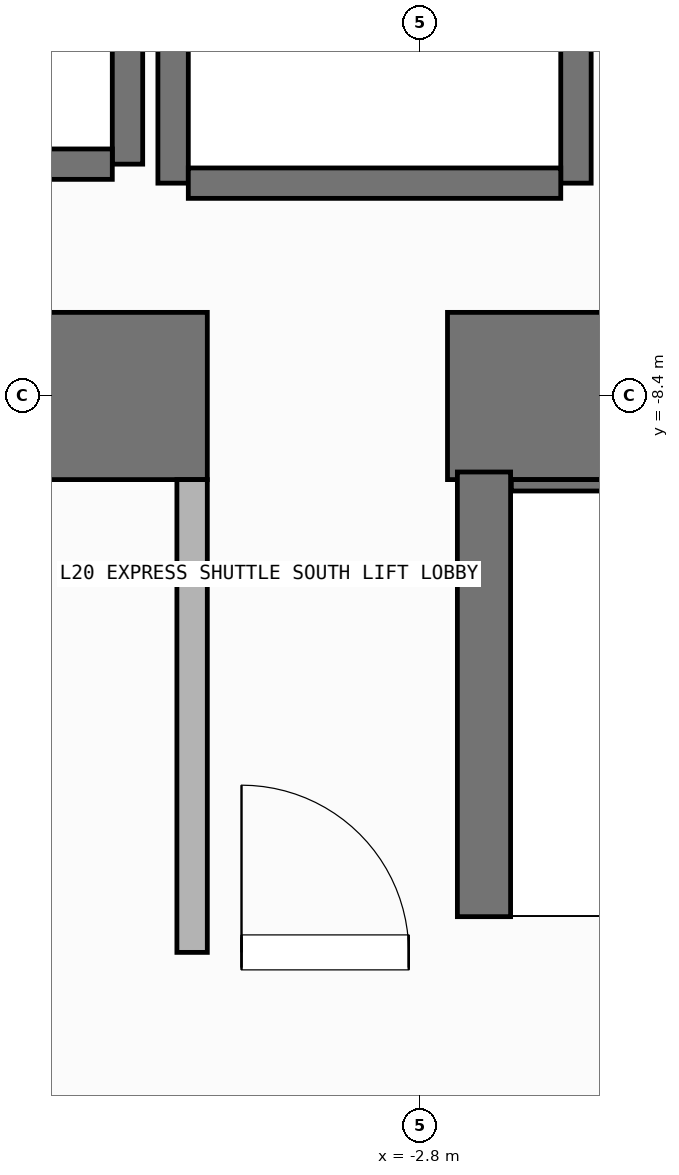
"""IFC4 building model, lengths in metres.
Left out: names, types, materials, properties, quantities, classifications, styles, units other than length and angle.
Written with IfcOpenShell. Run it as: python <this file> out.ifc"""

import sys

from ifc_helpers import new_model, si_unit, direction, frame, frame_2d, origin, place, context, subcontext, project, spatial, rectangle, extrude, element, fill, save


model = new_model("IFC4")
c1 = context("Model", 3, precision=1e-05, world=origin(), true_north=direction((0.0, 1.0)))
c2 = subcontext(c1, "Body", "Model", "MODEL_VIEW")
j1 = project(units=[si_unit("LENGTHUNIT", "METRE"), si_unit("PLANEANGLEUNIT", "RADIAN")], contexts=[c1])
p1 = place(None, origin())
s1 = spatial("IfcSite", under=j1, at=p1, CompositionType="ELEMENT")
p2 = place(p1, origin())
s2 = spatial("IfcBuilding", under=s1, at=p2, CompositionType="ELEMENT")
p3 = place(p2, frame((0.0, 0.0, 77.4)))
s3 = spatial("IfcBuildingStorey", under=s2, at=p3, CompositionType="ELEMENT", Elevation=77.4)
p4 = place(p3, frame((-7.55, -8.4, 0.0), z_axis=(0.0, 0.0, 1.0), x_axis=(1.0, 0.0, 0.0)))
e1 = element("IfcWall", 1, at=p4, inside=s3, PredefinedType="SHEAR", context=c2, shape_type="SweptSolid", body=[
    extrude(rectangle(XDim=3.35, YDim=1.1, at=frame_2d((1.675, 0.0))), origin(), (0.0, 0.0, 1.0), 7.8),
])
p5 = place(p3, frame((-2.62, -8.4, 0.0), z_axis=(0.0, 0.0, 1.0), x_axis=(1.0, 0.0, 0.0)))
e2 = element("IfcWall", 2, at=p5, inside=s3, PredefinedType="SHEAR", context=c2, shape_type="SweptSolid", body=[
    extrude(rectangle(XDim=7.27, YDim=1.1, at=frame_2d((3.635, 0.0))), origin(), (0.0, 0.0, 1.0), 7.8),
])
p6 = place(p3, frame((-2.555, -12.0, 0.0), z_axis=(0.0, 0.0, 1.0), x_axis=(1.0, 0.0, 0.0)))
e3 = element("IfcWall", 3, at=p6, inside=s3, PredefinedType="SHEAR", context=c2, shape_type="SweptSolid", body=[
    extrude(rectangle(XDim=7.31, YDim=0.35, at=frame_2d((3.655, 0.0))), origin(), (0.0, 0.0, 1.0), 7.8),
])
p7 = place(p3, frame((-2.2, -8.988, 0.0), z_axis=(0.0, 0.0, 1.0), x_axis=(1.0, 0.0, 0.0)))
e4 = element("IfcWall", 4, at=p7, inside=s3, PredefinedType="SHEAR", context=c2, shape_type="SweptSolid", body=[
    extrude(rectangle(XDim=6.6, YDim=0.075, at=frame_2d((3.3, 0.0))), origin(), (0.0, 0.0, 1.0), 7.8),
])
p8 = place(p3, frame((-2.38, -11.825, 0.0), z_axis=(0.0, 0.0, 1.0), x_axis=(0.0, 1.0, 0.0)))
e5 = element("IfcWall", 5, at=p8, inside=s3, PredefinedType="SHEAR", context=c2, shape_type="SweptSolid", body=[
    extrude(rectangle(XDim=2.925, YDim=0.35, at=frame_2d((1.462, 0.0))), origin(), (0.0, 0.0, 1.0), 7.8),
])
p9 = place(p3, frame((-4.725, -6.875, 0.0), z_axis=(0.0, 0.0, 1.0), x_axis=(0.0, 1.0, 0.0)))
e6 = element("IfcWall", 6, at=p9, inside=s3, PredefinedType="SHEAR", context=c2, shape_type="SweptSolid", body=[
    extrude(rectangle(XDim=2.55, YDim=0.2, at=frame_2d((1.275, 0.0))), origin(), (0.0, 0.0, 1.0), 7.52),
])
p10 = place(p3, frame((-7.175, -6.875, 0.0), z_axis=(0.0, 0.0, 1.0), x_axis=(1.0, 0.0, 0.0)))
e7 = element("IfcWall", 7, at=p10, inside=s3, PredefinedType="SHEAR", context=c2, shape_type="SweptSolid", body=[
    extrude(rectangle(XDim=2.35, YDim=0.2, at=frame_2d((1.175, 0.0))), origin(), (0.0, 0.0, 1.0), 7.52),
])
for number, where, z_axis, x_axis in (
    (8, (-4.425, -7.0, 0.0), (0.0, 0.0, 1.0), (0.0, 1.0, 0.0)),
    (9, (-1.775, -7.0, 0.0), (0.0, 0.0, 1.0), (0.0, 1.0, 0.0)),
):
    element("IfcWall", number, at=place(p3, frame(where, z_axis=z_axis, x_axis=x_axis)), inside=s3, PredefinedType="SHEAR", context=c2, shape_type="SweptSolid", body=[
        extrude(rectangle(XDim=2.8, YDim=0.2, at=frame_2d((1.4, 0.0))), origin(), (0.0, 0.0, 1.0), 7.52),
    ])
p11 = place(p3, frame((-4.325, -7.0, 0.0), z_axis=(0.0, 0.0, 1.0), x_axis=(1.0, 0.0, 0.0)))
e10 = element("IfcWall", 10, at=p11, inside=s3, PredefinedType="SHEAR", context=c2, shape_type="SweptSolid", body=[
    extrude(rectangle(XDim=2.45, YDim=0.2, at=frame_2d((1.225, 0.0))), origin(), (0.0, 0.0, 1.0), 7.52),
])
p12 = place(p3, frame((-4.3, -12.06, 0.0), z_axis=(0.0, 0.0, 1.0), x_axis=(1.0, 0.0, 0.0)))
e11 = element("IfcWall", 11, at=p12, inside=s3, PredefinedType="SOLIDWALL", context=c2, shape_type="SweptSolid", body=[
    extrude(rectangle(XDim=1.75, YDim=0.2, at=frame_2d((0.875, 0.0))), origin(), (0.0, 0.0, 1.0), 7.52),
])
p13 = place(p12, frame((0.325, 0.0, 0.0)))
e12 = element("IfcOpeningElement", 12, at=p13, cuts=e11, PredefinedType="OPENING", context=c2, shape_type="SweptSolid", body=[
    extrude(rectangle(XDim=1.1, YDim=2.15, at=frame_2d((0.55, 1.075))), frame((0.0, 0.11, 0.0), z_axis=(0.0, -1.0, 0.0), x_axis=(1.0, 0.0, 0.0)), (0.0, 0.0, 1.0), 0.22),
])
p14 = place(p3, frame((-4.3, -12.06, 0.0), z_axis=(0.0, 0.0, 1.0), x_axis=(0.0, 1.0, 0.0)))
e13 = element("IfcWall", 13, at=p14, inside=s3, PredefinedType="SOLIDWALL", context=c2, shape_type="SweptSolid", body=[
    extrude(rectangle(XDim=3.11, YDim=0.2, at=frame_2d((1.555, 0.0))), origin(), (0.0, 0.0, 1.0), 7.52),
])
p15 = place(p13, origin())
e14 = element("IfcDoor", 14, at=p15, inside=s3, OperationType="SINGLE_SWING_LEFT", PredefinedType="DOOR", context=c2, shape_type="SweptSolid", body=[
    extrude(rectangle(XDim=1.1, YDim=2.15, at=frame_2d((0.55, 1.075))), frame((0.0, 0.025, 0.0), z_axis=(0.0, -1.0, 0.0), x_axis=(1.0, 0.0, 0.0)), (0.0, 0.0, 1.0), 0.05),
])
fill(e12, e14)
save(model, sys.argv[1])
